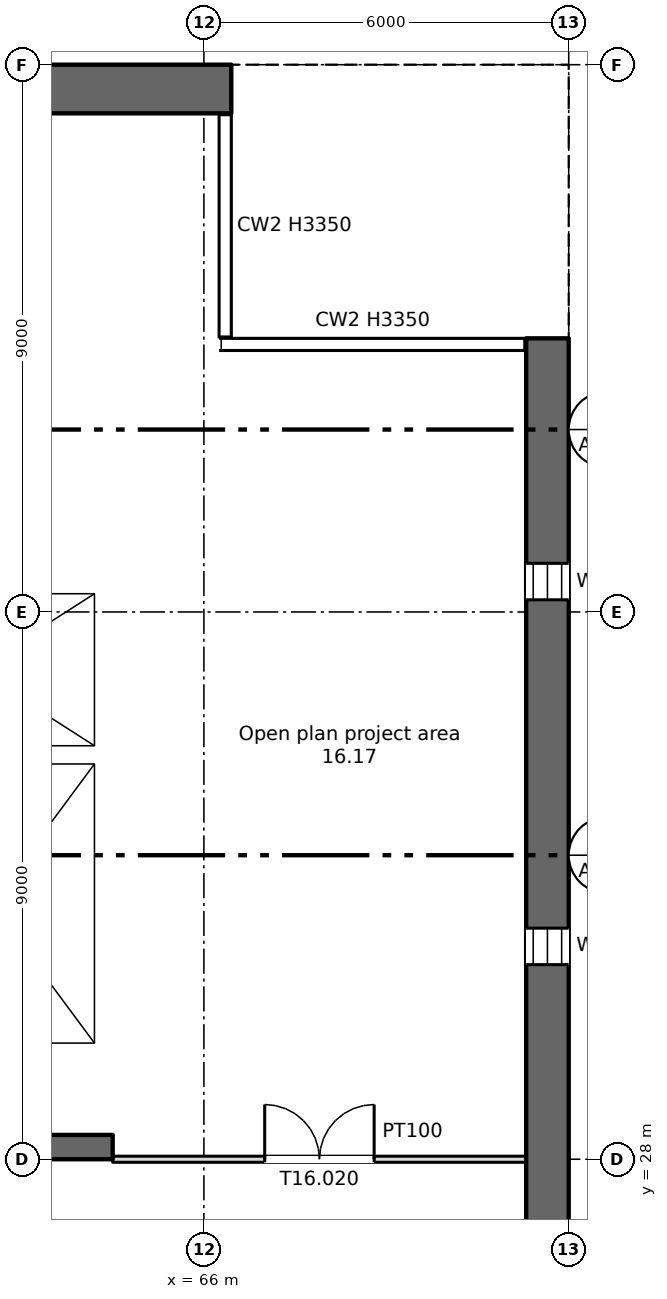
"""IFC4 building model, lengths in metres.
Left out: names, types, materials, properties, quantities, classifications, styles, units other than length and angle.
Written with IfcOpenShell. Run it as: python <this file> out.ifc"""

import sys

from ifc_helpers import new_model, si_unit, direction, frame, frame_2d, origin, place, context, subcontext, project, spatial, rectangle, extrude, element, fill, save


model = new_model("IFC4")
c1 = context("Model", 3, precision=1e-05, world=origin(), true_north=direction((0.0, 1.0)))
c2 = subcontext(c1, "Body", "Model", "MODEL_VIEW")
j1 = project(units=[si_unit("LENGTHUNIT", "METRE"), si_unit("PLANEANGLEUNIT", "RADIAN")], contexts=[c1])
p1 = place(None, origin())
s1 = spatial("IfcSite", under=j1, at=p1, CompositionType="ELEMENT")
p2 = place(p1, origin())
s2 = spatial("IfcBuilding", under=s1, at=p2, CompositionType="ELEMENT")
p3 = place(p2, frame((0.0, 0.0, 102.5)))
s3 = spatial("IfcBuildingStorey", under=s2, at=p3, CompositionType="ELEMENT", Elevation=102.5)
p4 = place(p3, frame((71.65, 6.0, 0.0), z_axis=(0.0, 0.0, 1.0), x_axis=(0.0, 1.0, 0.0)))
e1 = element("IfcWall", 1, at=p4, inside=s3, PredefinedType="SHEAR", context=c2, shape_type="SweptSolid", body=[
    extrude(rectangle(XDim=35.5, YDim=0.7, at=frame_2d((17.75, 0.0))), origin(), (0.0, 0.0, 1.0), 3.35),
])
p5 = place(p4, frame((1.2, 0.0, 0.6)))
e2 = element("IfcOpeningElement", 2, at=p5, cuts=e1, PredefinedType="OPENING", context=c2, shape_type="SweptSolid", body=[
    extrude(rectangle(XDim=0.6, YDim=2.4, at=frame_2d((0.3, 1.2))), frame((0.0, 0.36, 0.0), z_axis=(0.0, -1.0, 0.0), x_axis=(1.0, 0.0, 0.0)), (0.0, 0.0, 1.0), 0.72),
])
p6 = place(p4, frame((7.2, 0.0, 0.6)))
e3 = element("IfcOpeningElement", 3, at=p6, cuts=e1, PredefinedType="OPENING", context=c2, shape_type="SweptSolid", body=[
    extrude(rectangle(XDim=0.6, YDim=2.4, at=frame_2d((0.3, 1.2))), frame((0.0, 0.36, 0.0), z_axis=(0.0, -1.0, 0.0), x_axis=(1.0, 0.0, 0.0)), (0.0, 0.0, 1.0), 0.72),
])
p7 = place(p4, frame((13.2, 0.0, 0.6)))
e4 = element("IfcOpeningElement", 4, at=p7, cuts=e1, PredefinedType="OPENING", context=c2, shape_type="SweptSolid", body=[
    extrude(rectangle(XDim=0.6, YDim=2.4, at=frame_2d((0.3, 1.2))), frame((0.0, 0.36, 0.0), z_axis=(0.0, -1.0, 0.0), x_axis=(1.0, 0.0, 0.0)), (0.0, 0.0, 1.0), 0.72),
])
p8 = place(p4, frame((19.2, 0.0, 0.6)))
e5 = element("IfcOpeningElement", 5, at=p8, cuts=e1, PredefinedType="OPENING", context=c2, shape_type="SweptSolid", body=[
    extrude(rectangle(XDim=0.6, YDim=2.4, at=frame_2d((0.3, 1.2))), frame((0.0, 0.36, 0.0), z_axis=(0.0, -1.0, 0.0), x_axis=(1.0, 0.0, 0.0)), (0.0, 0.0, 1.0), 0.72),
])
p9 = place(p4, frame((25.2, 0.0, 0.6)))
e6 = element("IfcOpeningElement", 6, at=p9, cuts=e1, PredefinedType="OPENING", context=c2, shape_type="SweptSolid", body=[
    extrude(rectangle(XDim=0.6, YDim=2.4, at=frame_2d((0.3, 1.2))), frame((0.0, 0.36, 0.0), z_axis=(0.0, -1.0, 0.0), x_axis=(1.0, 0.0, 0.0)), (0.0, 0.0, 1.0), 0.72),
])
p10 = place(p4, frame((31.2, 0.0, 0.6)))
e7 = element("IfcOpeningElement", 7, at=p10, cuts=e1, PredefinedType="OPENING", context=c2, shape_type="SweptSolid", body=[
    extrude(rectangle(XDim=0.6, YDim=2.4, at=frame_2d((0.3, 1.2))), frame((0.0, 0.36, 0.0), z_axis=(0.0, -1.0, 0.0), x_axis=(1.0, 0.0, 0.0)), (0.0, 0.0, 1.0), 0.72),
])
p11 = place(p3, frame((5.55, 45.6, 0.0), z_axis=(0.0, 0.0, 1.0), x_axis=(1.0, 0.0, 0.0)))
e8 = element("IfcWall", 8, at=p11, inside=s3, PredefinedType="SHEAR", context=c2, shape_type="SweptSolid", body=[
    extrude(rectangle(XDim=60.9, YDim=0.8, at=frame_2d((30.45, 0.0))), origin(), (0.0, 0.0, 1.0), 3.35),
])
p12 = place(p11, frame((1.2, 0.0, 0.6)))
e9 = element("IfcOpeningElement", 9, at=p12, cuts=e8, PredefinedType="OPENING", context=c2, shape_type="SweptSolid", body=[
    extrude(rectangle(XDim=0.6, YDim=2.4, at=frame_2d((0.3, 1.2))), frame((0.0, 0.41, 0.0), z_axis=(0.0, -1.0, 0.0), x_axis=(1.0, 0.0, 0.0)), (0.0, 0.0, 1.0), 0.82),
])
p13 = place(p11, frame((7.2, 0.0, 0.6)))
e10 = element("IfcOpeningElement", 10, at=p13, cuts=e8, PredefinedType="OPENING", context=c2, shape_type="SweptSolid", body=[
    extrude(rectangle(XDim=0.6, YDim=2.4, at=frame_2d((0.3, 1.2))), frame((0.0, 0.41, 0.0), z_axis=(0.0, -1.0, 0.0), x_axis=(1.0, 0.0, 0.0)), (0.0, 0.0, 1.0), 0.82),
])
p14 = place(p3, frame((6.7, 28.2, 0.0), z_axis=(0.0, 0.0, 1.0), x_axis=(1.0, 0.0, 0.0)))
e11 = element("IfcWall", 11, at=p14, inside=s3, PredefinedType="SHEAR", context=c2, shape_type="SweptSolid", body=[
    extrude(rectangle(XDim=57.8, YDim=0.4, at=frame_2d((28.9, 0.0))), origin(), (0.0, 0.0, 1.0), 3.35),
])
p15 = place(p14, frame((13.85, 0.0, 0.0)))
e12 = element("IfcOpeningElement", 12, at=p15, cuts=e11, PredefinedType="OPENING", context=c2, shape_type="SweptSolid", body=[
    extrude(rectangle(XDim=0.9, YDim=2.1, at=frame_2d((0.45, 1.05))), frame((0.0, 0.21, 0.0), z_axis=(0.0, -1.0, 0.0), x_axis=(1.0, 0.0, 0.0)), (0.0, 0.0, 1.0), 0.42),
])
p16 = place(p14, frame((48.562, 0.0, 0.0)))
e13 = element("IfcOpeningElement", 13, at=p16, cuts=e11, PredefinedType="OPENING", context=c2, shape_type="SweptSolid", body=[
    extrude(rectangle(XDim=0.9, YDim=2.1, at=frame_2d((0.45, 1.05))), frame((0.0, 0.21, 0.0), z_axis=(0.0, -1.0, 0.0), x_axis=(1.0, 0.0, 0.0)), (0.0, 0.0, 1.0), 0.42),
])
p17 = place(p14, frame((51.137, 0.0, 0.0)))
e14 = element("IfcOpeningElement", 14, at=p17, cuts=e11, PredefinedType="OPENING", context=c2, shape_type="SweptSolid", body=[
    extrude(rectangle(XDim=0.9, YDim=2.1, at=frame_2d((0.45, 1.05))), frame((0.0, 0.21, 0.0), z_axis=(0.0, -1.0, 0.0), x_axis=(1.0, 0.0, 0.0)), (0.0, 0.0, 1.0), 0.42),
])
p18 = place(p14, frame((1.35, 0.0, 0.0)))
e15 = element("IfcOpeningElement", 15, at=p18, cuts=e11, PredefinedType="OPENING", context=c2, shape_type="SweptSolid", body=[
    extrude(rectangle(XDim=0.9, YDim=2.1, at=frame_2d((0.45, 1.05))), frame((0.0, 0.21, 0.0), z_axis=(0.0, -1.0, 0.0), x_axis=(1.0, 0.0, 0.0)), (0.0, 0.0, 1.0), 0.42),
])
p19 = place(p14, frame((4.7, 0.0, 0.0)))
e16 = element("IfcOpeningElement", 16, at=p19, cuts=e11, PredefinedType="OPENING", context=c2, shape_type="SweptSolid", body=[
    extrude(rectangle(XDim=1.2, YDim=2.1, at=frame_2d((0.6, 1.05))), frame((0.0, 0.21, 0.0), z_axis=(0.0, -1.0, 0.0), x_axis=(1.0, 0.0, 0.0)), (0.0, 0.0, 1.0), 0.42),
])
p20 = place(p14, frame((31.7, 0.0, 0.0)))
e17 = element("IfcOpeningElement", 17, at=p20, cuts=e11, PredefinedType="OPENING", context=c2, shape_type="SweptSolid", body=[
    extrude(rectangle(XDim=1.2, YDim=2.1, at=frame_2d((0.6, 1.05))), frame((0.0, 0.21, 0.0), z_axis=(0.0, -1.0, 0.0), x_axis=(1.0, 0.0, 0.0)), (0.0, 0.0, 1.0), 0.42),
])
p21 = place(p14, frame((55.2, 0.0, 0.0)))
e18 = element("IfcOpeningElement", 18, at=p21, cuts=e11, PredefinedType="OPENING", context=c2, shape_type="SweptSolid", body=[
    extrude(rectangle(XDim=1.2, YDim=2.1, at=frame_2d((0.6, 1.05))), frame((0.0, 0.21, 0.0), z_axis=(0.0, -1.0, 0.0), x_axis=(1.0, 0.0, 0.0)), (0.0, 0.0, 1.0), 0.42),
])
p22 = place(p14, frame((21.7, 0.0, 0.0)))
e19 = element("IfcOpeningElement", 19, at=p22, cuts=e11, PredefinedType="OPENING", context=c2, shape_type="SweptSolid", body=[
    extrude(rectangle(XDim=1.2, YDim=2.1, at=frame_2d((0.6, 1.05))), frame((0.0, 0.21, 0.0), z_axis=(0.0, -1.0, 0.0), x_axis=(1.0, 0.0, 0.0)), (0.0, 0.0, 1.0), 0.42),
])
p23 = place(p14, frame((41.7, 0.0, 0.0)))
e20 = element("IfcOpeningElement", 20, at=p23, cuts=e11, PredefinedType="OPENING", context=c2, shape_type="SweptSolid", body=[
    extrude(rectangle(XDim=1.2, YDim=2.1, at=frame_2d((0.6, 1.05))), frame((0.0, 0.21, 0.0), z_axis=(0.0, -1.0, 0.0), x_axis=(1.0, 0.0, 0.0)), (0.0, 0.0, 1.0), 0.42),
])
p24 = place(p14, frame((24.85, 0.0, 0.0)))
e21 = element("IfcOpeningElement", 21, at=p24, cuts=e11, PredefinedType="OPENING", context=c2, shape_type="SweptSolid", body=[
    extrude(rectangle(XDim=2.4, YDim=2.1, at=frame_2d((1.2, 1.05))), frame((0.0, 0.21, 0.0), z_axis=(0.0, -1.0, 0.0), x_axis=(1.0, 0.0, 0.0)), (0.0, 0.0, 1.0), 0.42),
])
p25 = place(p14, frame((37.35, 0.0, 0.0)))
e22 = element("IfcOpeningElement", 22, at=p25, cuts=e11, PredefinedType="OPENING", context=c2, shape_type="SweptSolid", body=[
    extrude(rectangle(XDim=2.4, YDim=2.1, at=frame_2d((1.2, 1.05))), frame((0.0, 0.21, 0.0), z_axis=(0.0, -1.0, 0.0), x_axis=(1.0, 0.0, 0.0)), (0.0, 0.0, 1.0), 0.42),
])
p26 = place(p14, frame((7.95, 0.0, 0.0)))
e23 = element("IfcOpeningElement", 23, at=p26, cuts=e11, PredefinedType="OPENING", context=c2, shape_type="SweptSolid", body=[
    extrude(rectangle(XDim=2.4, YDim=2.1, at=frame_2d((1.2, 1.05))), frame((0.0, 0.21, 0.0), z_axis=(0.0, -1.0, 0.0), x_axis=(1.0, 0.0, 0.0)), (0.0, 0.0, 1.0), 0.42),
])
p27 = place(p14, frame((28.85, 0.0, 0.0)))
e24 = element("IfcOpeningElement", 24, at=p27, cuts=e11, PredefinedType="OPENING", context=c2, shape_type="SweptSolid", body=[
    extrude(rectangle(XDim=0.9, YDim=2.1, at=frame_2d((0.45, 1.05))), frame((0.0, 0.21, 0.0), z_axis=(0.0, -1.0, 0.0), x_axis=(1.0, 0.0, 0.0)), (0.0, 0.0, 1.0), 0.42),
])
p28 = place(p14, frame((34.85, 0.0, 0.0)))
e25 = element("IfcOpeningElement", 25, at=p28, cuts=e11, PredefinedType="OPENING", context=c2, shape_type="SweptSolid", body=[
    extrude(rectangle(XDim=0.9, YDim=2.1, at=frame_2d((0.45, 1.05))), frame((0.0, 0.21, 0.0), z_axis=(0.0, -1.0, 0.0), x_axis=(1.0, 0.0, 0.0)), (0.0, 0.0, 1.0), 0.42),
])
p29 = place(p3, frame((64.35, 34.8, 0.0), z_axis=(0.0, 0.0, 1.0), x_axis=(0.0, 1.0, 0.0)))
e26 = element("IfcWall", 26, at=p29, inside=s3, PredefinedType="SHEAR", context=c2, shape_type="SweptSolid", body=[
    extrude(rectangle(XDim=10.4, YDim=0.3, at=frame_2d((5.2, 0.0))), origin(), (0.0, 0.0, 1.0), 3.35),
])
p30 = place(p3, frame((64.35, 28.4, 0.0), z_axis=(0.0, 0.0, 1.0), x_axis=(0.0, 1.0, 0.0)))
e27 = element("IfcWall", 27, at=p30, inside=s3, PredefinedType="SHEAR", context=c2, shape_type="SweptSolid", body=[
    extrude(rectangle(XDim=6.1, YDim=0.3, at=frame_2d((3.05, 0.0))), origin(), (0.0, 0.0, 1.0), 3.35),
])
p31 = place(p3, frame((60.3, 34.65, 0.0), z_axis=(0.0, 0.0, 1.0), x_axis=(1.0, 0.0, 0.0)))
e28 = element("IfcWall", 28, at=p31, inside=s3, PredefinedType="SHEAR", context=c2, shape_type="SweptSolid", body=[
    extrude(rectangle(XDim=4.2, YDim=0.3, at=frame_2d((2.1, 0.0))), origin(), (0.0, 0.0, 1.0), 3.35),
])
p32 = place(p3, frame((60.3, 37.45, 0.0), z_axis=(0.0, 0.0, 1.0), x_axis=(1.0, 0.0, 0.0)))
e29 = element("IfcWall", 29, at=p32, inside=s3, PredefinedType="SHEAR", context=c2, shape_type="SweptSolid", body=[
    extrude(rectangle(XDim=3.9, YDim=0.3, at=frame_2d((1.95, 0.0))), origin(), (0.0, 0.0, 1.0), 3.35),
])
p33 = place(p32, frame((1.4, 0.0, 0.0)))
e30 = element("IfcOpeningElement", 30, at=p33, cuts=e29, PredefinedType="OPENING", context=c2, shape_type="SweptSolid", body=[
    extrude(rectangle(XDim=1.1, YDim=2.1, at=frame_2d((0.55, 1.05))), frame((0.0, 0.16, 0.0), z_axis=(0.0, -1.0, 0.0), x_axis=(1.0, 0.0, 0.0)), (0.0, 0.0, 1.0), 0.32),
])
p34 = place(p3, frame((64.5, 28.0, 0.0), z_axis=(0.0, 0.0, 1.0), x_axis=(1.0, 0.0, 0.0)))
e31 = element("IfcWall", 31, at=p34, inside=s3, PredefinedType="PARTITIONING", context=c2, shape_type="SweptSolid", body=[
    extrude(rectangle(XDim=6.8, YDim=0.1, at=frame_2d((3.4, 0.0))), origin(), (0.0, 0.0, 1.0), 3.35),
])
p35 = place(p34, frame((2.5, 0.0, 0.0)))
e32 = element("IfcOpeningElement", 32, at=p35, cuts=e31, PredefinedType="OPENING", context=c2, shape_type="SweptSolid", body=[
    extrude(rectangle(XDim=1.8, YDim=2.1, at=frame_2d((0.9, 1.05))), frame((0.0, 0.06, 0.0), z_axis=(0.0, -1.0, 0.0), x_axis=(1.0, 0.0, 0.0)), (0.0, 0.0, 1.0), 0.12),
])
p36 = place(p9, origin())
e33 = element("IfcWindow", 33, at=p36, inside=s3, PartitioningType="SINGLE_PANEL", PredefinedType="WINDOW", context=c2, shape_type="SweptSolid", body=[
    extrude(rectangle(XDim=0.6, YDim=2.4, at=frame_2d((0.3, 1.2))), frame((0.0, 0.03, 0.0), z_axis=(0.0, -1.0, 0.0), x_axis=(1.0, 0.0, 0.0)), (0.0, 0.0, 1.0), 0.06),
])
fill(e6, e33)
p37 = place(p10, origin())
e34 = element("IfcWindow", 34, at=p37, inside=s3, PartitioningType="SINGLE_PANEL", PredefinedType="WINDOW", context=c2, shape_type="SweptSolid", body=[
    extrude(rectangle(XDim=0.6, YDim=2.4, at=frame_2d((0.3, 1.2))), frame((0.0, 0.03, 0.0), z_axis=(0.0, -1.0, 0.0), x_axis=(1.0, 0.0, 0.0)), (0.0, 0.0, 1.0), 0.06),
])
fill(e7, e34)
p38 = place(p35, origin())
e35 = element("IfcDoor", 35, at=p38, inside=s3, OperationType="DOUBLE_DOOR_SINGLE_SWING", PredefinedType="DOOR", context=c2, shape_type="SweptSolid", body=[
    extrude(rectangle(XDim=1.8, YDim=2.1, at=frame_2d((0.9, 1.05))), frame((0.0, 0.025, 0.0), z_axis=(0.0, -1.0, 0.0), x_axis=(1.0, 0.0, 0.0)), (0.0, 0.0, 1.0), 0.05),
])
fill(e32, e35)
save(model, sys.argv[1])
